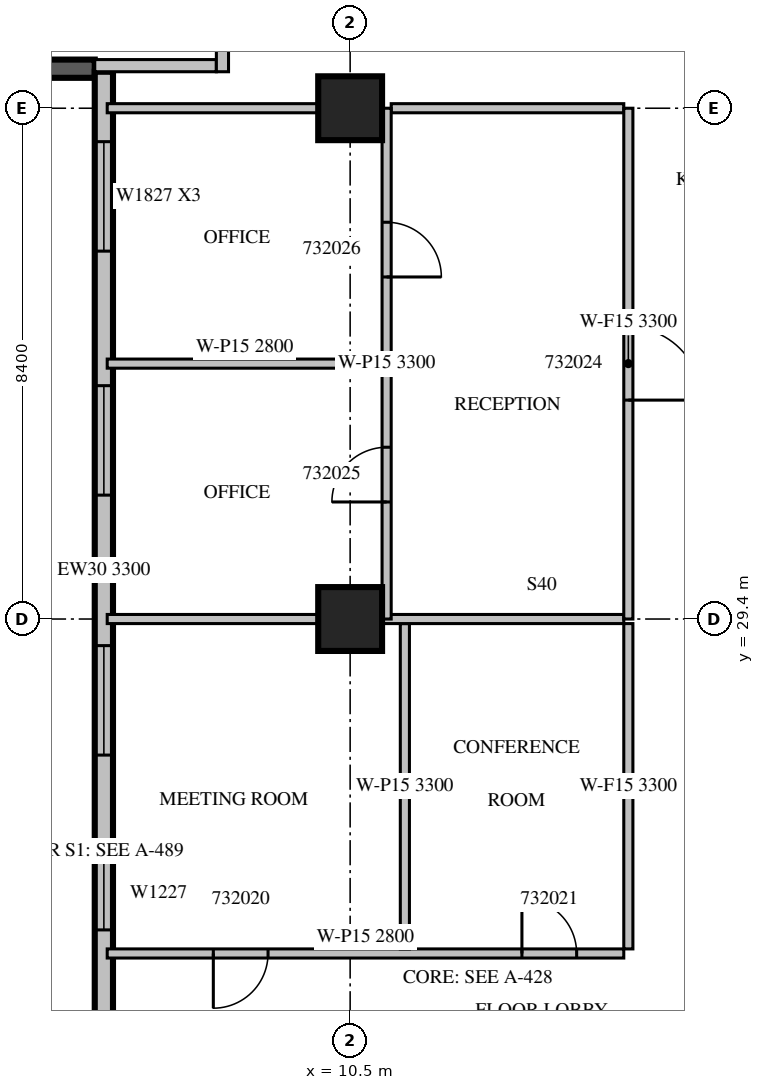
"""IFC4 building model, lengths in metres.
Left out: names, types, materials, properties, quantities, classifications, styles, units other than length and angle.
Written with IfcOpenShell. Run it as: python <this file> out.ifc"""

import sys

from ifc_helpers import new_model, si_unit, direction, frame, frame_2d, origin, origin_2d, place, context, subcontext, project, spatial, rectangle, extrude, source, transform, mapped, element, fill, save


model = new_model("IFC4")
c1 = context("Model", 3, precision=1e-05, world=origin(), true_north=direction((0.0, 1.0)))
c2 = subcontext(c1, "Body", "Model", "MODEL_VIEW")
j1 = project(units=[si_unit("LENGTHUNIT", "METRE"), si_unit("PLANEANGLEUNIT", "RADIAN")], contexts=[c1])
p1 = place(None, origin())
s1 = spatial("IfcSite", under=j1, at=p1, CompositionType="ELEMENT")
p2 = place(p1, origin())
s2 = spatial("IfcBuilding", under=s1, at=p2, CompositionType="ELEMENT")
p3 = place(p2, frame((0.0, 0.0, 145.5)))
s3 = spatial("IfcBuildingStorey", under=s2, at=p3, CompositionType="ELEMENT", Elevation=145.5)
m1 = source(origin(), c2, "Body", "SweptSolid", [
    extrude(rectangle(XDim=1.05, YDim=1.05, at=origin_2d()), origin(), (0.0, 0.0, 1.0), 4.2),
])
for number, where, z_axis, x_axis in (
    (1, (10.5, 29.4, 0.0), (0.0, 0.0, 1.0), (1.0, 0.0, 0.0)),
    (2, (10.5, 37.8, 0.0), (0.0, 0.0, 1.0), (1.0, 0.0, 0.0)),
):
    element("IfcColumn", number, at=place(p3, frame(where, z_axis=z_axis, x_axis=x_axis)), inside=s3, PredefinedType="COLUMN", context=c2, shape_type="MappedRepresentation", body=[
        mapped(m1, transform((0.0, 0.0, 0.0), scale=1.0)),
    ])
m2 = source(origin(), c2, "Body", "SweptSolid", [
    extrude(rectangle(XDim=6.1, YDim=0.3, at=frame_2d((3.05, 0.0))), origin(), (0.0, 0.0, 1.0), 3.8),
])
p4 = place(p3, frame((0.2, 38.45, 0.0), z_axis=(0.0, 0.0, 1.0), x_axis=(1.0, 0.0, 0.0)))
e3 = element("IfcWall", 3, at=p4, inside=s3, PredefinedType="SOLIDWALL", context=c2, shape_type="MappedRepresentation", body=[
    mapped(m2, transform((0.0, 0.0, 0.0), scale=1.0)),
])
m3 = source(origin(), c2, "Body", "SweptSolid", [
    extrude(rectangle(XDim=16.4, YDim=0.3, at=frame_2d((8.2, 0.0))), origin(), (0.0, 0.0, 1.0), 3.3),
])
p5 = place(p3, frame((6.45, 38.4, 0.0), z_axis=(0.0, 0.0, 1.0), x_axis=(0.0, -1.0, 0.0)))
e4 = element("IfcWall", 4, at=p5, inside=s3, PredefinedType="STANDARD", context=c2, shape_type="MappedRepresentation", body=[
    mapped(m3, transform((0.0, 0.0, 0.0), scale=1.0)),
])
m4 = source(origin(), c2, "Body", "SweptSolid", [
    extrude(rectangle(XDim=1.8, YDim=2.7, at=frame_2d((0.9, 1.35))), frame((0.0, 0.16, 0.0), z_axis=(0.0, -1.0, 0.0), x_axis=(1.0, 0.0, 0.0)), (0.0, 0.0, 1.0), 0.32),
])
p6 = place(p5, frame((1.15, 0.0, 0.6)))
e5 = element("IfcOpeningElement", 5, at=p6, cuts=e4, PredefinedType="OPENING", context=c2, shape_type="MappedRepresentation", body=[
    mapped(m4, transform((0.0, 0.0, 0.0), scale=1.0)),
])
p7 = place(p5, frame((5.162, 0.0, 0.6)))
e6 = element("IfcOpeningElement", 6, at=p7, cuts=e4, PredefinedType="OPENING", context=c2, shape_type="MappedRepresentation", body=[
    mapped(m4, transform((0.0, 0.0, 0.0), scale=1.0)),
])
p8 = place(p5, frame((9.438, 0.0, 0.6)))
e7 = element("IfcOpeningElement", 7, at=p8, cuts=e4, PredefinedType="OPENING", context=c2, shape_type="MappedRepresentation", body=[
    mapped(m4, transform((0.0, 0.0, 0.0), scale=1.0)),
])
m5 = source(origin(), c2, "Body", "SweptSolid", [
    extrude(rectangle(XDim=1.2, YDim=2.7, at=frame_2d((0.6, 1.35))), frame((0.0, 0.16, 0.0), z_axis=(0.0, -1.0, 0.0), x_axis=(1.0, 0.0, 0.0)), (0.0, 0.0, 1.0), 0.32),
])
p9 = place(p5, frame((12.912, 0.0, 0.6)))
e8 = element("IfcOpeningElement", 8, at=p9, cuts=e4, PredefinedType="OPENING", context=c2, shape_type="MappedRepresentation", body=[
    mapped(m5, transform((0.0, 0.0, 0.0), scale=1.0)),
])
m6 = source(origin(), c2, "Body", "SweptSolid", [
    extrude(rectangle(XDim=2.0, YDim=0.2, at=frame_2d((1.0, 0.0))), origin(), (0.0, 0.0, 1.0), 3.8),
])
p10 = place(p3, frame((6.3, 38.5, 0.0), z_axis=(0.0, 0.0, 1.0), x_axis=(1.0, 0.0, 0.0)))
e9 = element("IfcWall", 9, at=p10, inside=s3, PredefinedType="PARTITIONING", context=c2, shape_type="MappedRepresentation", body=[
    mapped(m6, transform((0.0, 0.0, 0.0), scale=1.0)),
])
m7 = source(origin(), c2, "Body", "SweptSolid", [
    extrude(rectangle(XDim=5.45, YDim=0.2, at=frame_2d((2.725, 0.0))), origin(), (0.0, 0.0, 1.0), 3.8),
])
p11 = place(p3, frame((8.4, 38.4, 0.0), z_axis=(0.0, 0.0, 1.0), x_axis=(0.0, 1.0, 0.0)))
e10 = element("IfcWall", 10, at=p11, inside=s3, PredefinedType="PARTITIONING", context=c2, shape_type="MappedRepresentation", body=[
    mapped(m7, transform((0.0, 0.0, 0.0), scale=1.0)),
])
m8 = source(origin(), c2, "Body", "SweptSolid", [
    extrude(rectangle(XDim=1.2, YDim=2.1, at=frame_2d((0.6, 1.05))), frame((0.0, 0.11, 0.0), z_axis=(0.0, -1.0, 0.0), x_axis=(1.0, 0.0, 0.0)), (0.0, 0.0, 1.0), 0.22),
])
p12 = place(p11, frame((0.4, 0.0, 0.0)))
e11 = element("IfcOpeningElement", 11, at=p12, cuts=e10, PredefinedType="OPENING", context=c2, shape_type="MappedRepresentation", body=[
    mapped(m8, transform((0.0, 0.0, 0.0), scale=1.0)),
])
m9 = source(origin(), c2, "Body", "SweptSolid", [
    extrude(rectangle(XDim=0.9, YDim=2.1, at=frame_2d((0.45, 1.05))), frame((0.0, 0.11, 0.0), z_axis=(0.0, -1.0, 0.0), x_axis=(1.0, 0.0, 0.0)), (0.0, 0.0, 1.0), 0.22),
])
p13 = place(p11, frame((3.25, 0.0, 0.0)))
e12 = element("IfcOpeningElement", 12, at=p13, cuts=e10, PredefinedType="OPENING", context=c2, shape_type="MappedRepresentation", body=[
    mapped(m9, transform((0.0, 0.0, 0.0), scale=1.0)),
])
m10 = source(origin(), c2, "Body", "SweptSolid", [
    extrude(rectangle(XDim=8.495, YDim=0.15, at=frame_2d((4.247, 0.0))), origin(), (0.0, 0.0, 1.0), 2.8),
])
p14 = place(p3, frame((6.505, 23.9, 0.0), z_axis=(0.0, 0.0, 1.0), x_axis=(1.0, 0.0, 0.0)))
e13 = element("IfcWall", 13, at=p14, inside=s3, PredefinedType="PARTITIONING", context=c2, shape_type="MappedRepresentation", body=[
    mapped(m10, transform((0.0, 0.0, 0.0), scale=1.0)),
])
m11 = source(origin(), c2, "Body", "SweptSolid", [
    extrude(rectangle(XDim=0.9, YDim=2.1, at=frame_2d((0.45, 1.05))), frame((0.0, 0.085, 0.0), z_axis=(0.0, -1.0, 0.0), x_axis=(1.0, 0.0, 0.0)), (0.0, 0.0, 1.0), 0.17),
])
p15 = place(p14, frame((1.745, 0.0, 0.0)))
e14 = element("IfcOpeningElement", 14, at=p15, cuts=e13, PredefinedType="OPENING", context=c2, shape_type="MappedRepresentation", body=[
    mapped(m11, transform((0.0, 0.0, 0.0), scale=1.0)),
])
p16 = place(p14, frame((6.82, 0.0, 0.0)))
e15 = element("IfcOpeningElement", 15, at=p16, cuts=e13, PredefinedType="OPENING", context=c2, shape_type="MappedRepresentation", body=[
    mapped(m11, transform((0.0, 0.0, 0.0), scale=1.0)),
])
p17 = place(p3, frame((11.4, 23.975, 0.0), z_axis=(0.0, 0.0, 1.0), x_axis=(0.0, 1.0, 0.0)))
e16 = element("IfcWall", 16, at=p17, inside=s3, PredefinedType="PARTITIONING", context=c2, shape_type="SweptSolid", body=[
    extrude(rectangle(XDim=5.35, YDim=0.15, at=frame_2d((2.675, 0.0))), origin(), (0.0, 0.0, 1.0), 3.3),
])
m12 = source(origin(), c2, "Body", "SweptSolid", [
    extrude(rectangle(XDim=5.35, YDim=0.15, at=frame_2d((2.675, 0.0))), origin(), (0.0, 0.0, 1.0), 3.3),
])
p18 = place(p3, frame((15.075, 23.975, 0.0), z_axis=(0.0, 0.0, 1.0), x_axis=(0.0, 1.0, 0.0)))
e17 = element("IfcWall", 17, at=p18, inside=s3, PredefinedType="PARTITIONING", context=c2, shape_type="MappedRepresentation", body=[
    mapped(m12, transform((0.0, 0.0, 0.0), scale=1.0)),
])
m13 = source(origin(), c2, "Body", "SweptSolid", [
    extrude(rectangle(XDim=3.471, YDim=0.15, at=frame_2d((1.736, 0.0))), origin(), (0.0, 0.0, 1.0), 3.8),
])
p19 = place(p3, frame((9.976, 29.4, 0.0), z_axis=(0.0, 0.0, 1.0), x_axis=(-1.0, 0.0, 0.0)))
e18 = element("IfcWall", 18, at=p19, inside=s3, PredefinedType="PARTITIONING", context=c2, shape_type="MappedRepresentation", body=[
    mapped(m13, transform((0.0, 0.0, 0.0), scale=1.0)),
])
m14 = source(origin(), c2, "Body", "SweptSolid", [
    extrude(rectangle(XDim=3.976, YDim=0.15, at=frame_2d((1.988, 0.0))), origin(), (0.0, 0.0, 1.0), 3.8),
])
p20 = place(p3, frame((15.0, 29.4, 0.0), z_axis=(0.0, 0.0, 1.0), x_axis=(-1.0, 0.0, 0.0)))
e19 = element("IfcWall", 19, at=p20, inside=s3, PredefinedType="PARTITIONING", context=c2, shape_type="MappedRepresentation", body=[
    mapped(m14, transform((0.0, 0.0, 0.0), scale=1.0)),
])
m15 = source(origin(), c2, "Body", "SweptSolid", [
    extrude(rectangle(XDim=4.52, YDim=0.15, at=frame_2d((2.26, 0.0))), origin(), (0.0, 0.0, 1.0), 2.8),
])
p21 = place(p3, frame((11.025, 33.6, 0.0), z_axis=(0.0, 0.0, 1.0), x_axis=(-1.0, 0.0, 0.0)))
e20 = element("IfcWall", 20, at=p21, inside=s3, PredefinedType="PARTITIONING", context=c2, shape_type="MappedRepresentation", body=[
    mapped(m15, transform((0.0, 0.0, 0.0), scale=1.0)),
])
p22 = place(p3, frame((9.976, 37.8, 0.0), z_axis=(0.0, 0.0, 1.0), x_axis=(-1.0, 0.0, 0.0)))
e21 = element("IfcWall", 21, at=p22, inside=s3, PredefinedType="PARTITIONING", context=c2, shape_type="MappedRepresentation", body=[
    mapped(m13, transform((0.0, 0.0, 0.0), scale=1.0)),
])
m16 = source(origin(), c2, "Body", "SweptSolid", [
    extrude(rectangle(XDim=3.825, YDim=0.15, at=frame_2d((1.913, 0.0))), origin(), (0.0, 0.0, 1.0), 3.8),
])
p23 = place(p3, frame((15.0, 37.8, 0.0), z_axis=(0.0, 0.0, 1.0), x_axis=(-1.0, 0.0, 0.0)))
e22 = element("IfcWall", 22, at=p23, inside=s3, PredefinedType="PARTITIONING", context=c2, shape_type="MappedRepresentation", body=[
    mapped(m16, transform((0.0, 0.0, 0.0), scale=1.0)),
])
m17 = source(origin(), c2, "Body", "SweptSolid", [
    extrude(rectangle(XDim=8.4, YDim=0.15, at=frame_2d((4.2, 0.0))), origin(), (0.0, 0.0, 1.0), 3.3),
])
p24 = place(p3, frame((11.1, 29.4, 0.0), z_axis=(0.0, 0.0, 1.0), x_axis=(0.0, 1.0, 0.0)))
e23 = element("IfcWall", 23, at=p24, inside=s3, PredefinedType="PARTITIONING", context=c2, shape_type="MappedRepresentation", body=[
    mapped(m17, transform((0.0, 0.0, 0.0), scale=1.0)),
])
p25 = place(p24, frame((1.925, 0.0, 0.0)))
e24 = element("IfcOpeningElement", 24, at=p25, cuts=e23, PredefinedType="OPENING", context=c2, shape_type="MappedRepresentation", body=[
    mapped(m11, transform((0.0, 0.0, 0.0), scale=1.0)),
])
p26 = place(p24, frame((5.625, 0.0, 0.0)))
e25 = element("IfcOpeningElement", 25, at=p26, cuts=e23, PredefinedType="OPENING", context=c2, shape_type="MappedRepresentation", body=[
    mapped(m11, transform((0.0, 0.0, 0.0), scale=1.0)),
])
p27 = place(p3, frame((15.075, 29.4, 0.0), z_axis=(0.0, 0.0, 1.0), x_axis=(0.0, 1.0, 0.0)))
e26 = element("IfcWall", 26, at=p27, inside=s3, PredefinedType="PARTITIONING", context=c2, shape_type="MappedRepresentation", body=[
    mapped(m17, transform((0.0, 0.0, 0.0), scale=1.0)),
])
m18 = source(origin(), c2, "Body", "SweptSolid", [
    extrude(rectangle(XDim=1.2, YDim=2.1, at=frame_2d((0.6, 1.05))), frame((0.0, 0.085, 0.0), z_axis=(0.0, -1.0, 0.0), x_axis=(1.0, 0.0, 0.0)), (0.0, 0.0, 1.0), 0.17),
])
p28 = place(p27, frame((3.6, 0.0, 0.0)))
e27 = element("IfcOpeningElement", 27, at=p28, cuts=e26, PredefinedType="OPENING", context=c2, shape_type="MappedRepresentation", body=[
    mapped(m18, transform((0.0, 0.0, 0.0), scale=1.0)),
])
m19 = source(origin(), c2, "Body", "SweptSolid", [
    extrude(rectangle(XDim=1.8, YDim=2.7, at=frame_2d((0.9, 1.35))), frame((0.0, 0.03, 0.0), z_axis=(0.0, -1.0, 0.0), x_axis=(1.0, 0.0, 0.0)), (0.0, 0.0, 1.0), 0.06),
])
p29 = place(p6, origin())
e28 = element("IfcWindow", 28, at=p29, inside=s3, PartitioningType="SINGLE_PANEL", PredefinedType="WINDOW", context=c2, shape_type="MappedRepresentation", body=[
    mapped(m19, transform((0.0, 0.0, 0.0), scale=1.0)),
])
fill(e5, e28)
p30 = place(p7, origin())
e29 = element("IfcWindow", 29, at=p30, inside=s3, PartitioningType="SINGLE_PANEL", PredefinedType="WINDOW", context=c2, shape_type="MappedRepresentation", body=[
    mapped(m19, transform((0.0, 0.0, 0.0), scale=1.0)),
])
fill(e6, e29)
p31 = place(p8, origin())
e30 = element("IfcWindow", 30, at=p31, inside=s3, PartitioningType="SINGLE_PANEL", PredefinedType="WINDOW", context=c2, shape_type="MappedRepresentation", body=[
    mapped(m19, transform((0.0, 0.0, 0.0), scale=1.0)),
])
fill(e7, e30)
m20 = source(origin(), c2, "Body", "SweptSolid", [
    extrude(rectangle(XDim=1.2, YDim=2.7, at=frame_2d((0.6, 1.35))), frame((0.0, 0.03, 0.0), z_axis=(0.0, -1.0, 0.0), x_axis=(1.0, 0.0, 0.0)), (0.0, 0.0, 1.0), 0.06),
])
p32 = place(p9, origin())
e31 = element("IfcWindow", 31, at=p32, inside=s3, PartitioningType="SINGLE_PANEL", PredefinedType="WINDOW", context=c2, shape_type="MappedRepresentation", body=[
    mapped(m20, transform((0.0, 0.0, 0.0), scale=1.0)),
])
fill(e8, e31)
m21 = source(origin(), c2, "Body", "SweptSolid", [
    extrude(rectangle(XDim=0.9, YDim=2.1, at=frame_2d((0.45, 1.05))), frame((0.0, 0.025, 0.0), z_axis=(0.0, -1.0, 0.0), x_axis=(1.0, 0.0, 0.0)), (0.0, 0.0, 1.0), 0.05),
])
p33 = place(p15, origin())
e32 = element("IfcDoor", 32, at=p33, inside=s3, OperationType="SINGLE_SWING_RIGHT", PredefinedType="DOOR", context=c2, shape_type="MappedRepresentation", body=[
    mapped(m21, transform((0.0, 0.0, 0.0), scale=1.0)),
])
fill(e14, e32)
p34 = place(p16, origin())
e33 = element("IfcDoor", 33, at=p34, inside=s3, OperationType="SINGLE_SWING_LEFT", PredefinedType="DOOR", context=c2, shape_type="MappedRepresentation", body=[
    mapped(m21, transform((0.0, 0.0, 0.0), scale=1.0)),
])
fill(e15, e33)
m22 = source(origin(), c2, "Body", "SweptSolid", [
    extrude(rectangle(XDim=1.2, YDim=2.1, at=frame_2d((0.6, 1.05))), frame((0.0, 0.025, 0.0), z_axis=(0.0, -1.0, 0.0), x_axis=(1.0, 0.0, 0.0)), (0.0, 0.0, 1.0), 0.05),
])
p35 = place(p28, origin())
e34 = element("IfcDoor", 34, at=p35, inside=s3, OperationType="SINGLE_SWING_RIGHT", PredefinedType="DOOR", context=c2, shape_type="MappedRepresentation", body=[
    mapped(m22, transform((0.0, 0.0, 0.0), scale=1.0)),
])
fill(e27, e34)
p36 = place(p25, origin())
e35 = element("IfcDoor", 35, at=p36, inside=s3, OperationType="SINGLE_SWING_LEFT", PredefinedType="DOOR", context=c2, shape_type="MappedRepresentation", body=[
    mapped(m21, transform((0.0, 0.0, 0.0), scale=1.0)),
])
fill(e24, e35)
p37 = place(p26, origin())
e36 = element("IfcDoor", 36, at=p37, inside=s3, OperationType="SINGLE_SWING_RIGHT", PredefinedType="DOOR", context=c2, shape_type="MappedRepresentation", body=[
    mapped(m21, transform((0.0, 0.0, 0.0), scale=1.0)),
])
fill(e25, e36)
save(model, sys.argv[1])
